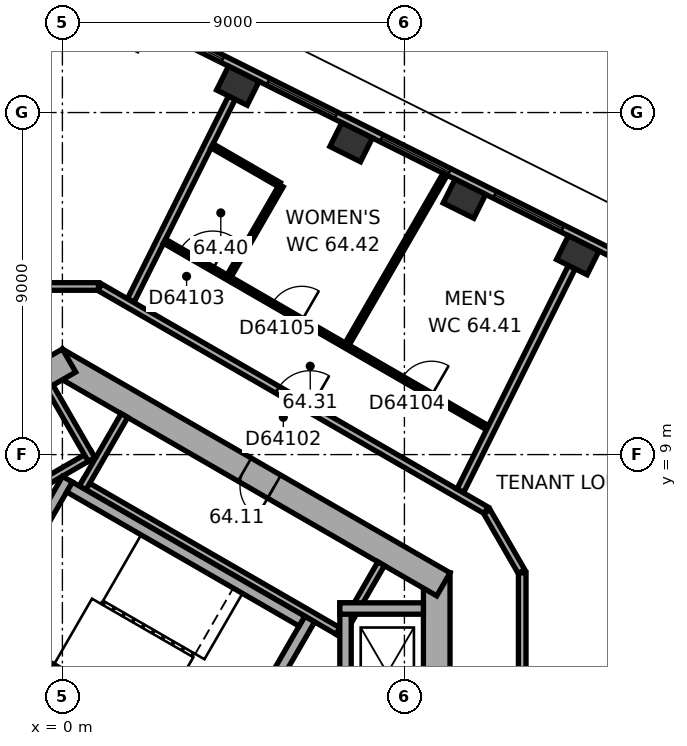
"""IFC4 building model, lengths in metres.
Left out: names, types, materials, properties, quantities, classifications, styles, units other than length and angle.
Written with IfcOpenShell. Run it as: python <this file> out.ifc"""

import sys

from ifc_helpers import new_model, si_unit, direction, frame, frame_2d, origin, origin_2d, place, context, subcontext, project, spatial, rectangle, extrude, element, fill, save


model = new_model("IFC4")
c1 = context("Model", 3, precision=1e-05, world=origin(), true_north=direction((0.0, 1.0)))
c2 = subcontext(c1, "Body", "Model", "MODEL_VIEW")
j1 = project(units=[si_unit("LENGTHUNIT", "METRE"), si_unit("PLANEANGLEUNIT", "RADIAN")], contexts=[c1])
p1 = place(None, origin())
s1 = spatial("IfcSite", under=j1, at=p1, CompositionType="ELEMENT")
p2 = place(p1, origin())
s2 = spatial("IfcBuilding", under=s1, at=p2, CompositionType="ELEMENT")
p3 = place(p2, frame((0.0, 0.0, 259.8)))
s3 = spatial("IfcBuildingStorey", under=s2, at=p3, CompositionType="ELEMENT", Elevation=259.8)
for number, where, z_axis, x_axis in (
    (1, (13.561, 14.246, 0.0), (0.0, 0.0, 1.0), (-0.895, 0.446, 0.0)),
    (2, (10.58, 15.732, 0.0), (0.0, 0.0, 1.0), (-0.895, 0.446, 0.0)),
    (3, (7.598, 17.219, 0.0), (0.0, 0.0, 1.0), (-0.895, 0.446, 0.0)),
    (4, (4.616, 18.706, 0.0), (0.0, 0.0, 1.0), (-0.895, 0.446, 0.0)),
):
    element("IfcColumn", number, at=place(p3, frame(where, z_axis=z_axis, x_axis=x_axis)), inside=s3, PredefinedType="COLUMN", context=c2, shape_type="SweptSolid", body=[
        extrude(rectangle(XDim=0.9, YDim=0.7, at=origin_2d()), origin(), (0.0, 0.0, 1.0), 3.7),
    ])
p4 = place(p3, frame((9.85, -5.889, 0.0), z_axis=(0.0, 0.0, 1.0), x_axis=(0.0, 1.0, 0.0)))
e5 = element("IfcWall", 5, at=p4, inside=s3, PredefinedType="SHEAR", context=c2, shape_type="SweptSolid", body=[
    extrude(rectangle(XDim=11.778, YDim=0.7, at=frame_2d((5.889, 0.0))), origin(), (0.0, 0.0, 1.0), 3.7),
])
p5 = place(p4, frame((6.089, 0.0, 0.0)))
e6 = element("IfcOpeningElement", 6, at=p5, cuts=e5, PredefinedType="OPENING", context=c2, shape_type="SweptSolid", body=[
    extrude(rectangle(XDim=1.5, YDim=2.1, at=frame_2d((0.75, 1.05))), frame((0.0, 0.36, 0.0), z_axis=(0.0, -1.0, 0.0), x_axis=(1.0, 0.0, 0.0)), (0.0, 0.0, 1.0), 0.72),
])
p6 = place(p4, frame((2.939, 0.0, 0.0)))
e7 = element("IfcOpeningElement", 7, at=p6, cuts=e5, PredefinedType="OPENING", context=c2, shape_type="SweptSolid", body=[
    extrude(rectangle(XDim=0.9, YDim=2.1, at=frame_2d((0.45, 1.05))), frame((0.0, 0.36, 0.0), z_axis=(0.0, -1.0, 0.0), x_axis=(1.0, 0.0, 0.0)), (0.0, 0.0, 1.0), 0.72),
])
p7 = place(p3, frame((10.025, 5.586, 0.0), z_axis=(0.0, 0.0, 1.0), x_axis=(-0.866026453023, 0.499998182661, 0.0)))
e8 = element("IfcWall", 8, at=p7, inside=s3, PredefinedType="SHEAR", context=c2, shape_type="SweptSolid", body=[
    extrude(rectangle(XDim=11.778, YDim=0.7, at=frame_2d((5.889, 0.0))), origin(), (0.0, 0.0, 1.0), 3.7),
])
p8 = place(p7, frame((5.139, 0.0, 0.0)))
e9 = element("IfcOpeningElement", 9, at=p8, cuts=e8, PredefinedType="OPENING", context=c2, shape_type="SweptSolid", body=[
    extrude(rectangle(XDim=0.9, YDim=2.1, at=frame_2d((0.45, 1.05))), frame((0.0, 0.36, 0.0), z_axis=(0.0, -1.0, 0.0), x_axis=(1.0, 0.0, 0.0)), (0.0, 0.0, 1.0), 0.72),
])
p9 = place(p3, frame((0.175, 11.475, 0.0), z_axis=(0.0, 0.0, 1.0), x_axis=(-0.866026453023, -0.499998182661, 0.0)))
e10 = element("IfcWall", 10, at=p9, inside=s3, PredefinedType="SHEAR", context=c2, shape_type="SweptSolid", body=[
    extrude(rectangle(XDim=11.778, YDim=0.7, at=frame_2d((5.889, 0.0))), origin(), (0.0, 0.0, 1.0), 3.7),
])
p10 = place(p9, frame((6.089, 0.0, 0.0)))
e11 = element("IfcOpeningElement", 11, at=p10, cuts=e10, PredefinedType="OPENING", context=c2, shape_type="SweptSolid", body=[
    extrude(rectangle(XDim=1.5, YDim=2.1, at=frame_2d((0.75, 1.05))), frame((0.0, 0.36, 0.0), z_axis=(0.0, -1.0, 0.0), x_axis=(1.0, 0.0, 0.0)), (0.0, 0.0, 1.0), 0.72),
])
p11 = place(p9, frame((2.939, 0.0, 0.0)))
e12 = element("IfcOpeningElement", 12, at=p11, cuts=e10, PredefinedType="OPENING", context=c2, shape_type="SweptSolid", body=[
    extrude(rectangle(XDim=0.9, YDim=2.1, at=frame_2d((0.45, 1.05))), frame((0.0, 0.36, 0.0), z_axis=(0.0, -1.0, 0.0), x_axis=(1.0, 0.0, 0.0)), (0.0, 0.0, 1.0), 0.72),
])
p12 = place(p3, frame((17.223, 12.923, 0.0), z_axis=(0.0, 0.0, 1.0), x_axis=(-0.894930561148, 0.44620543556, 0.0)))
e13 = element("IfcWall", 13, at=p12, inside=s3, PredefinedType="STANDARD", context=c2, shape_type="SweptSolid", body=[
    extrude(rectangle(XDim=17.731, YDim=0.2, at=frame_2d((8.866, 0.0))), origin(), (0.0, 0.0, 1.0), 3.7),
])
p13 = place(p12, frame((1.202, 0.0, 0.9)))
e14 = element("IfcOpeningElement", 14, at=p13, cuts=e13, PredefinedType="OPENING", context=c2, shape_type="SweptSolid", body=[
    extrude(rectangle(XDim=2.0, YDim=2.0, at=frame_2d((1.0, 1.0))), frame((0.0, 0.11, 0.0), z_axis=(0.0, -1.0, 0.0), x_axis=(1.0, 0.0, 0.0)), (0.0, 0.0, 1.0), 0.22),
])
p14 = place(p12, frame((4.533, 0.0, 0.9)))
e15 = element("IfcOpeningElement", 15, at=p14, cuts=e13, PredefinedType="OPENING", context=c2, shape_type="SweptSolid", body=[
    extrude(rectangle(XDim=2.0, YDim=2.0, at=frame_2d((1.0, 1.0))), frame((0.0, 0.11, 0.0), z_axis=(0.0, -1.0, 0.0), x_axis=(1.0, 0.0, 0.0)), (0.0, 0.0, 1.0), 0.22),
])
p15 = place(p12, frame((7.865, 0.0, 0.9)))
e16 = element("IfcOpeningElement", 16, at=p15, cuts=e13, PredefinedType="OPENING", context=c2, shape_type="SweptSolid", body=[
    extrude(rectangle(XDim=2.0, YDim=2.0, at=frame_2d((1.0, 1.0))), frame((0.0, 0.11, 0.0), z_axis=(0.0, -1.0, 0.0), x_axis=(1.0, 0.0, 0.0)), (0.0, 0.0, 1.0), 0.22),
])
p16 = place(p12, frame((11.197, 0.0, 0.9)))
e17 = element("IfcOpeningElement", 17, at=p16, cuts=e13, PredefinedType="OPENING", context=c2, shape_type="SweptSolid", body=[
    extrude(rectangle(XDim=2.0, YDim=2.0, at=frame_2d((1.0, 1.0))), frame((0.0, 0.11, 0.0), z_axis=(0.0, -1.0, 0.0), x_axis=(1.0, 0.0, 0.0)), (0.0, 0.0, 1.0), 0.22),
])
p17 = place(p12, frame((14.528, 0.0, 0.9)))
e18 = element("IfcOpeningElement", 18, at=p17, cuts=e13, PredefinedType="OPENING", context=c2, shape_type="SweptSolid", body=[
    extrude(rectangle(XDim=2.0, YDim=2.0, at=frame_2d((1.0, 1.0))), frame((0.0, 0.11, 0.0), z_axis=(0.0, -1.0, 0.0), x_axis=(1.0, 0.0, 0.0)), (0.0, 0.0, 1.0), 0.22),
])
p18 = place(p3, frame((7.424, 4.259, 0.0), z_axis=(0.0, 0.0, 1.0), x_axis=(-0.866026010844, 0.49999894854, 0.0)))
e19 = element("IfcWall", 19, at=p18, inside=s3, PredefinedType="PARTITIONING", context=c2, shape_type="SweptSolid", body=[
    extrude(rectangle(XDim=8.0, YDim=0.2, at=frame_2d((4.0, 0.0))), origin(), (0.0, 0.0, 1.0), 3.42),
])
for number, where, z_axis, x_axis in (
    (20, (7.287, 4.222, 0.0), (0.0, 0.0, 1.0), (0.5, 0.866, 0.0)),
    (21, (0.532, 8.122, 0.0), (0.0, 0.0, 1.0), (0.5, 0.866, 0.0)),
):
    element("IfcWall", number, at=place(p3, frame(where, z_axis=z_axis, x_axis=x_axis)), inside=s3, PredefinedType="PARTITIONING", context=c2, shape_type="SweptSolid", body=[
        extrude(rectangle(XDim=2.2, YDim=0.2, at=frame_2d((1.1, 0.0))), origin(), (0.0, 0.0, 1.0), 3.42),
    ])
p19 = place(p3, frame((0.803, 9.009, 0.0), z_axis=(0.0, 0.0, 1.0), x_axis=(-0.866028230842, -0.499995103361, 0.0)))
e22 = element("IfcWall", 22, at=p19, inside=s3, PredefinedType="PARTITIONING", context=c2, shape_type="SweptSolid", body=[
    extrude(rectangle(XDim=5.4, YDim=0.2, at=frame_2d((2.7, 0.0))), origin(), (0.0, 0.0, 1.0), 3.42),
])
p20 = place(p3, frame((0.767, 8.872, 0.0), z_axis=(0.0, 0.0, 1.0), x_axis=(-0.499994660107, 0.866028486751, 0.0)))
e23 = element("IfcWall", 23, at=p20, inside=s3, PredefinedType="PARTITIONING", context=c2, shape_type="SweptSolid", body=[
    extrude(rectangle(XDim=2.2, YDim=0.2, at=frame_2d((1.1, 0.0))), origin(), (0.0, 0.0, 1.0), 3.42),
])
p21 = place(p3, frame((4.158, 0.602, 0.0), z_axis=(0.0, 0.0, 1.0), x_axis=(0.499977259774, 0.866038532462, 0.0)))
e24 = element("IfcWall", 24, at=p21, inside=s3, PredefinedType="SHEAR", context=c2, shape_type="SweptSolid", body=[
    extrude(rectangle(XDim=4.7, YDim=0.3, at=frame_2d((2.35, 0.0))), origin(), (0.0, 0.0, 1.0), 3.42),
])
p22 = place(p21, frame((0.8, 0.0, 0.0)))
e25 = element("IfcOpeningElement", 25, at=p22, cuts=e24, PredefinedType="OPENING", context=c2, shape_type="SweptSolid", body=[
    extrude(rectangle(XDim=1.2, YDim=2.1, at=frame_2d((0.6, 1.05))), frame((0.0, 0.16, 0.0), z_axis=(0.0, -1.0, 0.0), x_axis=(1.0, 0.0, 0.0)), (0.0, 0.0, 1.0), 0.32),
])
p23 = place(p3, frame((-2.216, 4.282, 0.0), z_axis=(0.0, 0.0, 1.0), x_axis=(0.499977259774, 0.866038532462, 0.0)))
e26 = element("IfcWall", 26, at=p23, inside=s3, PredefinedType="SHEAR", context=c2, shape_type="SweptSolid", body=[
    extrude(rectangle(XDim=4.7, YDim=0.3, at=frame_2d((2.35, 0.0))), origin(), (0.0, 0.0, 1.0), 3.42),
])
for number, where, z_axis, x_axis in (
    (27, (4.103, 0.807, 0.0), (0.0, 0.0, 1.0), (-0.866, 0.5, 0.0)),
    (28, (6.303, 4.617, 0.0), (0.0, 0.0, 1.0), (-0.866, 0.5, 0.0)),
):
    element("IfcWall", number, at=place(p3, frame(where, z_axis=z_axis, x_axis=x_axis)), inside=s3, PredefinedType="SHEAR", context=c2, shape_type="SweptSolid", body=[
        extrude(rectangle(XDim=7.06, YDim=0.3, at=frame_2d((3.53, 0.0))), origin(), (0.0, 0.0, 1.0), 3.42),
    ])
p24 = place(p3, frame((7.45, 1.75, 0.0), z_axis=(0.0, 0.0, 1.0), x_axis=(0.0, 1.0, 0.0)))
e29 = element("IfcWall", 29, at=p24, inside=s3, PredefinedType="SHEAR", context=c2, shape_type="SweptSolid", body=[
    extrude(rectangle(XDim=3.35, YDim=0.3, at=frame_2d((1.675, 0.0))), origin(), (0.0, 0.0, 1.0), 3.42),
])
p25 = place(p3, frame((7.3, 4.95, 0.0), z_axis=(0.0, 0.0, 1.0), x_axis=(1.0, 0.0, 0.0)))
e30 = element("IfcWall", 30, at=p25, inside=s3, PredefinedType="SHEAR", context=c2, shape_type="SweptSolid", body=[
    extrude(rectangle(XDim=2.2, YDim=0.3, at=frame_2d((1.1, 0.0))), origin(), (0.0, 0.0, 1.0), 3.42),
])
p26 = place(p3, frame((0.95, 13.423, 0.0), z_axis=(0.0, 0.0, 1.0), x_axis=(-1.0, 0.0, 0.0)))
e31 = element("IfcWall", 31, at=p26, inside=s3, PredefinedType="PARTITIONING", context=c2, shape_type="SweptSolid", body=[
    extrude(rectangle(XDim=1.86, YDim=0.2, at=frame_2d((0.93, 0.0))), origin(), (0.0, 0.0, 1.0), 3.42),
])
p27 = place(p3, frame((4.388, 13.702, 0.0), z_axis=(0.0, 0.0, 1.0), x_axis=(0.500048966069, 0.865997131366, 0.0)))
e32 = element("IfcWall", 32, at=p27, inside=s3, PredefinedType="PARTITIONING", context=c2, shape_type="SweptSolid", body=[
    extrude(rectangle(XDim=2.74, YDim=0.12, at=frame_2d((1.37, 0.0))), origin(), (0.0, 0.0, 1.0), 3.42),
])
p28 = place(p3, frame((4.46, 18.392, 0.0), z_axis=(0.0, 0.0, 1.0), x_axis=(-0.446197360024, -0.894934587502, 0.0)))
e33 = element("IfcWall", 33, at=p28, inside=s3, PredefinedType="PARTITIONING", context=c2, shape_type="SweptSolid", body=[
    extrude(rectangle(XDim=5.96, YDim=0.2, at=frame_2d((2.98, 0.0))), origin(), (0.0, 0.0, 1.0), 2.87),
])
p29 = place(p3, frame((5.706, 16.104, 0.0), z_axis=(0.0, 0.0, 1.0), x_axis=(-0.866040114423, 0.499974519561, 0.0)))
e34 = element("IfcWall", 34, at=p29, inside=s3, PredefinedType="PARTITIONING", context=c2, shape_type="SweptSolid", body=[
    extrude(rectangle(XDim=2.04, YDim=0.12, at=frame_2d((1.02, 0.0))), origin(), (0.0, 0.0, 1.0), 3.42),
])
p30 = place(p3, frame((10.072, 16.376, 0.0), z_axis=(0.0, 0.0, 1.0), x_axis=(-0.499972385701, -0.86604134632, 0.0)))
e35 = element("IfcWall", 35, at=p30, inside=s3, PredefinedType="PARTITIONING", context=c2, shape_type="SweptSolid", body=[
    extrude(rectangle(XDim=5.158, YDim=0.12, at=frame_2d((2.579, 0.0))), origin(), (0.0, 0.0, 1.0), 2.87),
])
p31 = place(p3, frame((11.15, 7.534, 0.0), z_axis=(0.0, 0.0, 1.0), x_axis=(-0.866026603062, 0.499997922785, 0.0)))
e36 = element("IfcWall", 36, at=p31, inside=s3, PredefinedType="PARTITIONING", context=c2, shape_type="SweptSolid", body=[
    extrude(rectangle(XDim=11.738, YDim=0.2, at=frame_2d((5.869, 0.0))), origin(), (0.0, 0.0, 1.0), 3.42),
])
p32 = place(p31, frame((5.345, 0.0, 0.0)))
e37 = element("IfcOpeningElement", 37, at=p32, cuts=e36, PredefinedType="OPENING", context=c2, shape_type="SweptSolid", body=[
    extrude(rectangle(XDim=1.0, YDim=2.1, at=frame_2d((0.5, 1.05))), frame((0.0, 0.11, 0.0), z_axis=(0.0, -1.0, 0.0), x_axis=(1.0, 0.0, 0.0)), (0.0, 0.0, 1.0), 0.22),
])
p33 = place(p3, frame((11.187, 9.707, 0.0), z_axis=(0.0, 0.0, 1.0), x_axis=(-0.866033133531, 0.499986611447, 0.0)))
e38 = element("IfcWall", 38, at=p33, inside=s3, PredefinedType="PARTITIONING", context=c2, shape_type="SweptSolid", body=[
    extrude(rectangle(XDim=9.814, YDim=0.12, at=frame_2d((4.907, 0.0))), origin(), (0.0, 0.0, 1.0), 3.42),
])
p34 = place(p33, frame((8.349, 0.0, 0.0)))
e39 = element("IfcOpeningElement", 39, at=p34, cuts=e38, PredefinedType="OPENING", context=c2, shape_type="SweptSolid", body=[
    extrude(rectangle(XDim=1.0, YDim=2.1, at=frame_2d((0.5, 1.05))), frame((0.0, 0.07, 0.0), z_axis=(0.0, -1.0, 0.0), x_axis=(1.0, 0.0, 0.0)), (0.0, 0.0, 1.0), 0.14),
])
p35 = place(p33, frame((1.7, 0.0, 0.0)))
e40 = element("IfcOpeningElement", 40, at=p35, cuts=e38, PredefinedType="OPENING", context=c2, shape_type="SweptSolid", body=[
    extrude(rectangle(XDim=0.9, YDim=2.1, at=frame_2d((0.45, 1.05))), frame((0.0, 0.07, 0.0), z_axis=(0.0, -1.0, 0.0), x_axis=(1.0, 0.0, 0.0)), (0.0, 0.0, 1.0), 0.14),
])
p36 = place(p33, frame((5.642, 0.0, 0.0)))
e41 = element("IfcOpeningElement", 41, at=p36, cuts=e38, PredefinedType="OPENING", context=c2, shape_type="SweptSolid", body=[
    extrude(rectangle(XDim=0.9, YDim=2.1, at=frame_2d((0.45, 1.05))), frame((0.0, 0.07, 0.0), z_axis=(0.0, -1.0, 0.0), x_axis=(1.0, 0.0, 0.0)), (0.0, 0.0, 1.0), 0.14),
])
p37 = place(p3, frame((12.08, 5.924, 0.0), z_axis=(0.0, 0.0, 1.0), x_axis=(-0.500004960326, 0.86602253992, 0.0)))
e42 = element("IfcWall", 42, at=p37, inside=s3, PredefinedType="PARTITIONING", context=c2, shape_type="SweptSolid", body=[
    extrude(rectangle(XDim=1.82, YDim=0.2, at=frame_2d((0.91, 0.0))), origin(), (0.0, 0.0, 1.0), 3.42),
])
p38 = place(p3, frame((12.1, 2.448, 0.0), z_axis=(0.0, 0.0, 1.0), x_axis=(0.0, 1.0, 0.0)))
e43 = element("IfcWall", 43, at=p38, inside=s3, PredefinedType="PARTITIONING", context=c2, shape_type="SweptSolid", body=[
    extrude(rectangle(XDim=3.441, YDim=0.2, at=frame_2d((1.72, 0.0))), origin(), (0.0, 0.0, 1.0), 3.42),
])
p39 = place(p3, frame((13.405, 13.933, 0.0), z_axis=(0.0, 0.0, 1.0), x_axis=(-0.446187838644, -0.894939334618, 0.0)))
e44 = element("IfcWall", 44, at=p39, inside=s3, PredefinedType="PARTITIONING", context=c2, shape_type="SweptSolid", body=[
    extrude(rectangle(XDim=6.571, YDim=0.2, at=frame_2d((3.286, 0.0))), origin(), (0.0, 0.0, 1.0), 3.42),
])
p40 = place(p14, origin())
e45 = element("IfcWindow", 45, at=p40, inside=s3, PartitioningType="SINGLE_PANEL", PredefinedType="WINDOW", context=c2, shape_type="SweptSolid", body=[
    extrude(rectangle(XDim=2.0, YDim=2.0, at=frame_2d((1.0, 1.0))), frame((0.0, 0.03, 0.0), z_axis=(0.0, -1.0, 0.0), x_axis=(1.0, 0.0, 0.0)), (0.0, 0.0, 1.0), 0.06),
])
fill(e15, e45)
p41 = place(p15, origin())
e46 = element("IfcWindow", 46, at=p41, inside=s3, PartitioningType="SINGLE_PANEL", PredefinedType="WINDOW", context=c2, shape_type="SweptSolid", body=[
    extrude(rectangle(XDim=2.0, YDim=2.0, at=frame_2d((1.0, 1.0))), frame((0.0, 0.03, 0.0), z_axis=(0.0, -1.0, 0.0), x_axis=(1.0, 0.0, 0.0)), (0.0, 0.0, 1.0), 0.06),
])
fill(e16, e46)
p42 = place(p16, origin())
e47 = element("IfcWindow", 47, at=p42, inside=s3, PartitioningType="SINGLE_PANEL", PredefinedType="WINDOW", context=c2, shape_type="SweptSolid", body=[
    extrude(rectangle(XDim=2.0, YDim=2.0, at=frame_2d((1.0, 1.0))), frame((0.0, 0.03, 0.0), z_axis=(0.0, -1.0, 0.0), x_axis=(1.0, 0.0, 0.0)), (0.0, 0.0, 1.0), 0.06),
])
fill(e17, e47)
p43 = place(p17, origin())
e48 = element("IfcWindow", 48, at=p43, inside=s3, PartitioningType="SINGLE_PANEL", PredefinedType="WINDOW", context=c2, shape_type="SweptSolid", body=[
    extrude(rectangle(XDim=2.0, YDim=2.0, at=frame_2d((1.0, 1.0))), frame((0.0, 0.03, 0.0), z_axis=(0.0, -1.0, 0.0), x_axis=(1.0, 0.0, 0.0)), (0.0, 0.0, 1.0), 0.06),
])
fill(e18, e48)
p44 = place(p8, origin())
e49 = element("IfcDoor", 49, at=p44, inside=s3, OperationType="SINGLE_SWING_LEFT", PredefinedType="DOOR", context=c2, shape_type="SweptSolid", body=[
    extrude(rectangle(XDim=0.9, YDim=2.1, at=frame_2d((0.45, 1.05))), frame((0.0, 0.025, 0.0), z_axis=(0.0, -1.0, 0.0), x_axis=(1.0, 0.0, 0.0)), (0.0, 0.0, 1.0), 0.05),
])
fill(e9, e49)
p45 = place(p32, origin())
e50 = element("IfcDoor", 50, at=p45, inside=s3, OperationType="SINGLE_SWING_LEFT", PredefinedType="DOOR", context=c2, shape_type="SweptSolid", body=[
    extrude(rectangle(XDim=1.0, YDim=2.1, at=frame_2d((0.5, 1.05))), frame((0.0, 0.025, 0.0), z_axis=(0.0, -1.0, 0.0), x_axis=(1.0, 0.0, 0.0)), (0.0, 0.0, 1.0), 0.05),
])
fill(e37, e50)
p46 = place(p34, origin())
e51 = element("IfcDoor", 51, at=p46, inside=s3, OperationType="SINGLE_SWING_LEFT", PredefinedType="DOOR", context=c2, shape_type="SweptSolid", body=[
    extrude(rectangle(XDim=1.0, YDim=2.1, at=frame_2d((0.5, 1.05))), frame((0.0, 0.025, 0.0), z_axis=(0.0, -1.0, 0.0), x_axis=(1.0, 0.0, 0.0)), (0.0, 0.0, 1.0), 0.05),
])
fill(e39, e51)
p47 = place(p35, origin())
e52 = element("IfcDoor", 52, at=p47, inside=s3, OperationType="SINGLE_SWING_LEFT", PredefinedType="DOOR", context=c2, shape_type="SweptSolid", body=[
    extrude(rectangle(XDim=0.9, YDim=2.1, at=frame_2d((0.45, 1.05))), frame((0.0, 0.025, 0.0), z_axis=(0.0, -1.0, 0.0), x_axis=(1.0, 0.0, 0.0)), (0.0, 0.0, 1.0), 0.05),
])
fill(e40, e52)
p48 = place(p36, origin())
e53 = element("IfcDoor", 53, at=p48, inside=s3, OperationType="SINGLE_SWING_LEFT", PredefinedType="DOOR", context=c2, shape_type="SweptSolid", body=[
    extrude(rectangle(XDim=0.9, YDim=2.1, at=frame_2d((0.45, 1.05))), frame((0.0, 0.025, 0.0), z_axis=(0.0, -1.0, 0.0), x_axis=(1.0, 0.0, 0.0)), (0.0, 0.0, 1.0), 0.05),
])
fill(e41, e53)
save(model, sys.argv[1])
